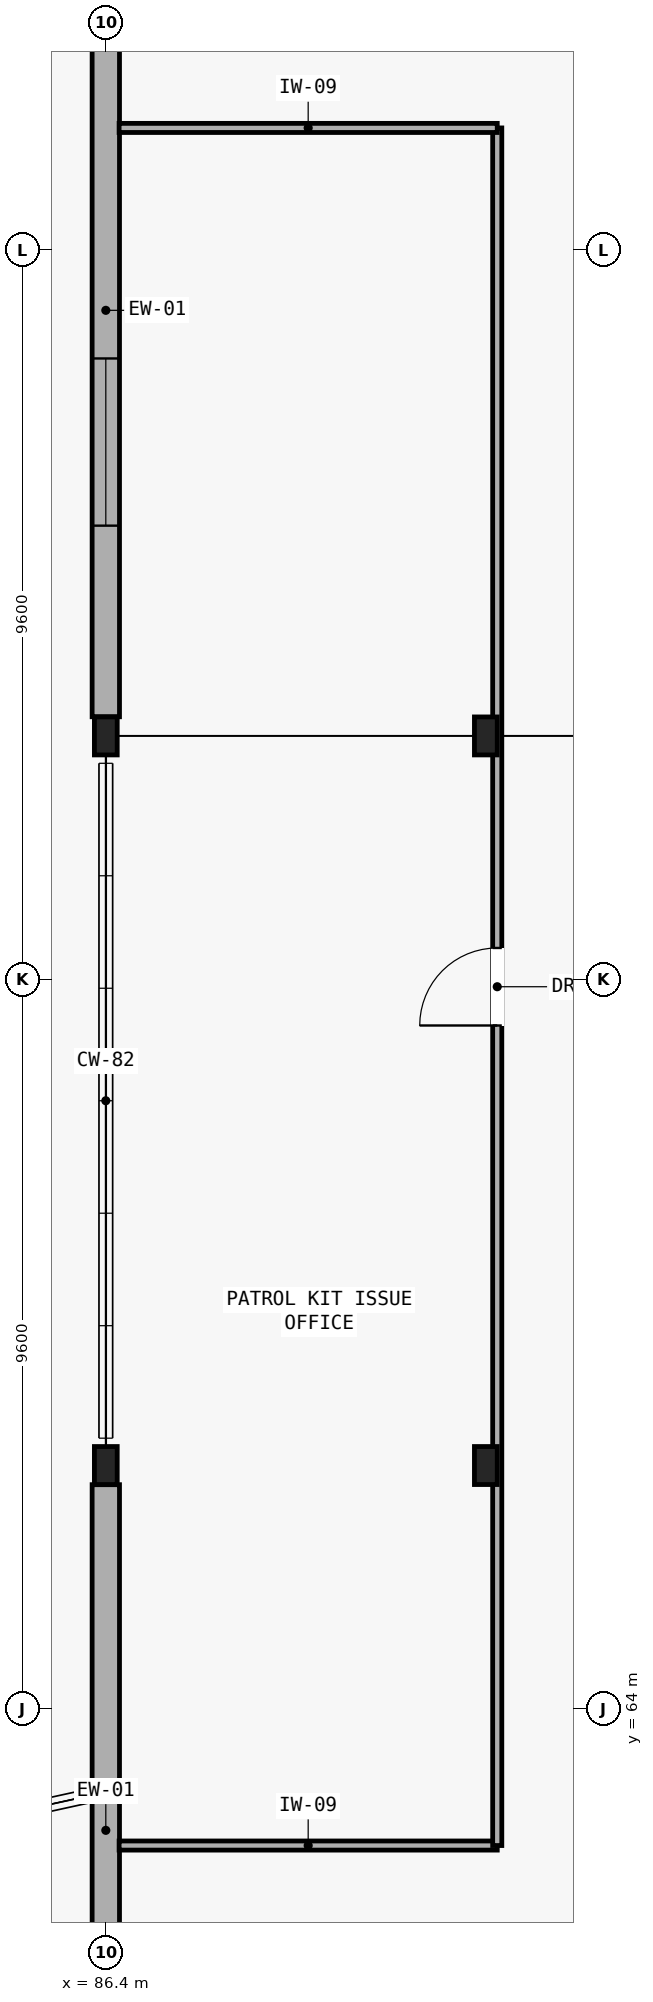
"""IFC4 building model, lengths in metres.
Left out: names, types, materials, properties, quantities, classifications, styles, units other than length and angle.
Written with IfcOpenShell. Run it as: python <this file> out.ifc"""

import sys

from ifc_helpers import new_model, si_unit, direction, frame, frame_2d, origin, origin_2d, place, context, subcontext, project, spatial, rectangle, i_section, extrude, element, fill, save


model = new_model("IFC4")
c1 = context("Model", 3, precision=1e-05, world=origin(), true_north=direction((0.0, 1.0)))
c2 = subcontext(c1, "Body", "Model", "MODEL_VIEW")
j1 = project(units=[si_unit("LENGTHUNIT", "METRE"), si_unit("PLANEANGLEUNIT", "RADIAN")], contexts=[c1])
p1 = place(None, origin())
s1 = spatial("IfcSite", under=j1, at=p1, CompositionType="ELEMENT")
p2 = place(p1, origin())
s2 = spatial("IfcBuilding", under=s1, at=p2, CompositionType="ELEMENT")
p3 = place(p2, origin())
s3 = spatial("IfcBuildingStorey", under=s2, at=p3, CompositionType="ELEMENT", Elevation=0.0)
for number, where, z_axis, x_axis in (
    (1, (86.4, 67.2, 0.0), (0.0, 0.0, 1.0), (1.0, 0.0, 0.0)),
    (2, (91.4, 67.2, 0.0), (0.0, 0.0, 1.0), (1.0, 0.0, 0.0)),
    (3, (86.4, 76.8, 0.0), (0.0, 0.0, 1.0), (1.0, 0.0, 0.0)),
    (4, (91.4, 76.8, 0.0), (0.0, 0.0, 1.0), (1.0, 0.0, 0.0)),
):
    element("IfcColumn", number, at=place(p3, frame(where, z_axis=z_axis, x_axis=x_axis)), inside=s3, PredefinedType="COLUMN", context=c2, shape_type="SweptSolid", body=[
        extrude(i_section(OverallWidth=0.3, OverallDepth=0.5, WebThickness=0.014, FlangeThickness=0.028, FilletRadius=0.027, at=origin_2d()), origin(), (0.0, 0.0, 1.0), 5.25),
    ])
p4 = place(p3, frame((86.4, 57.852, 0.0), z_axis=(0.0, 0.0, 1.0), x_axis=(0.0, 1.0, 0.0)))
e5 = element("IfcWall", 5, at=p4, inside=s3, PredefinedType="SOLIDWALL", context=c2, shape_type="SweptSolid", body=[
    extrude(rectangle(XDim=9.096, YDim=0.36, at=frame_2d((4.548, 0.0))), origin(), (0.0, 0.0, 1.0), 4.54),
])
p5 = place(p4, frame((1.748, 0.0, 0.0)))
e6 = element("IfcOpeningElement", 6, at=p5, cuts=e5, PredefinedType="OPENING", context=c2, shape_type="SweptSolid", body=[
    extrude(rectangle(XDim=1.5, YDim=2.2, at=frame_2d((0.75, 1.1))), frame((0.0, 0.19, 0.0), z_axis=(0.0, -1.0, 0.0), x_axis=(1.0, 0.0, 0.0)), (0.0, 0.0, 1.0), 0.38),
])
p6 = place(p3, frame((86.4, 77.052, 0.0), z_axis=(0.0, 0.0, 1.0), x_axis=(0.0, 1.0, 0.0)))
e7 = element("IfcWall", 7, at=p6, inside=s3, PredefinedType="SOLIDWALL", context=c2, shape_type="SweptSolid", body=[
    extrude(rectangle(XDim=10.696, YDim=0.36, at=frame_2d((5.348, 0.0))), origin(), (0.0, 0.0, 1.0), 4.54),
])
p7 = place(p6, frame((2.515, 0.0, 0.9)))
e8 = element("IfcOpeningElement", 8, at=p7, cuts=e7, PredefinedType="OPENING", context=c2, shape_type="SweptSolid", body=[
    extrude(rectangle(XDim=2.2, YDim=1.15, at=frame_2d((1.1, 0.575))), frame((0.0, 0.19, 0.0), z_axis=(0.0, -1.0, 0.0), x_axis=(1.0, 0.0, 0.0)), (0.0, 0.0, 1.0), 0.38),
])
p8 = place(p3, frame((86.575, 62.2, 0.0), z_axis=(0.0, 0.0, 1.0), x_axis=(1.0, 0.0, 0.0)))
e9 = element("IfcWall", 9, at=p8, inside=s3, PredefinedType="PARTITIONING", context=c2, shape_type="SweptSolid", body=[
    extrude(rectangle(XDim=4.975, YDim=0.12, at=frame_2d((2.488, 0.0))), origin(), (0.0, 0.0, 1.0), 5.0),
])
p9 = place(p3, frame((91.55, 62.2, 0.0), z_axis=(0.0, 0.0, 1.0), x_axis=(0.0, 1.0, 0.0)))
e10 = element("IfcWall", 10, at=p9, inside=s3, PredefinedType="PARTITIONING", context=c2, shape_type="SweptSolid", body=[
    extrude(rectangle(XDim=22.6, YDim=0.12, at=frame_2d((11.3, 0.0))), origin(), (0.0, 0.0, 1.0), 4.54),
])
p10 = place(p9, frame((10.79, 0.0, 0.0)))
e11 = element("IfcOpeningElement", 11, at=p10, cuts=e10, PredefinedType="OPENING", context=c2, shape_type="SweptSolid", body=[
    extrude(rectangle(XDim=1.02, YDim=2.1, at=frame_2d((0.51, 1.05))), frame((0.0, 0.07, 0.0), z_axis=(0.0, -1.0, 0.0), x_axis=(1.0, 0.0, 0.0)), (0.0, 0.0, 1.0), 0.14),
])
p11 = place(p3, frame((91.55, 84.8, 0.0), z_axis=(0.0, 0.0, 1.0), x_axis=(-1.0, 0.0, 0.0)))
e12 = element("IfcWall", 12, at=p11, inside=s3, PredefinedType="PARTITIONING", context=c2, shape_type="SweptSolid", body=[
    extrude(rectangle(XDim=4.975, YDim=0.12, at=frame_2d((2.488, 0.0))), origin(), (0.0, 0.0, 1.0), 5.0),
])
p12 = place(p7, origin())
e13 = element("IfcWindow", 13, at=p12, inside=s3, PartitioningType="SINGLE_PANEL", PredefinedType="WINDOW", context=c2, shape_type="SweptSolid", body=[
    extrude(rectangle(XDim=2.2, YDim=1.15, at=frame_2d((1.1, 0.575))), frame((0.0, 0.03, 0.0), z_axis=(0.0, -1.0, 0.0), x_axis=(1.0, 0.0, 0.0)), (0.0, 0.0, 1.0), 0.06),
])
fill(e8, e13)
p13 = place(p10, origin())
e14 = element("IfcDoor", 14, at=p13, inside=s3, OperationType="SINGLE_SWING_LEFT", PredefinedType="DOOR", context=c2, shape_type="SweptSolid", body=[
    extrude(rectangle(XDim=1.02, YDim=2.1, at=frame_2d((0.51, 1.05))), frame((0.0, 0.025, 0.0), z_axis=(0.0, -1.0, 0.0), x_axis=(1.0, 0.0, 0.0)), (0.0, 0.0, 1.0), 0.05),
])
fill(e11, e14)
save(model, sys.argv[1])
